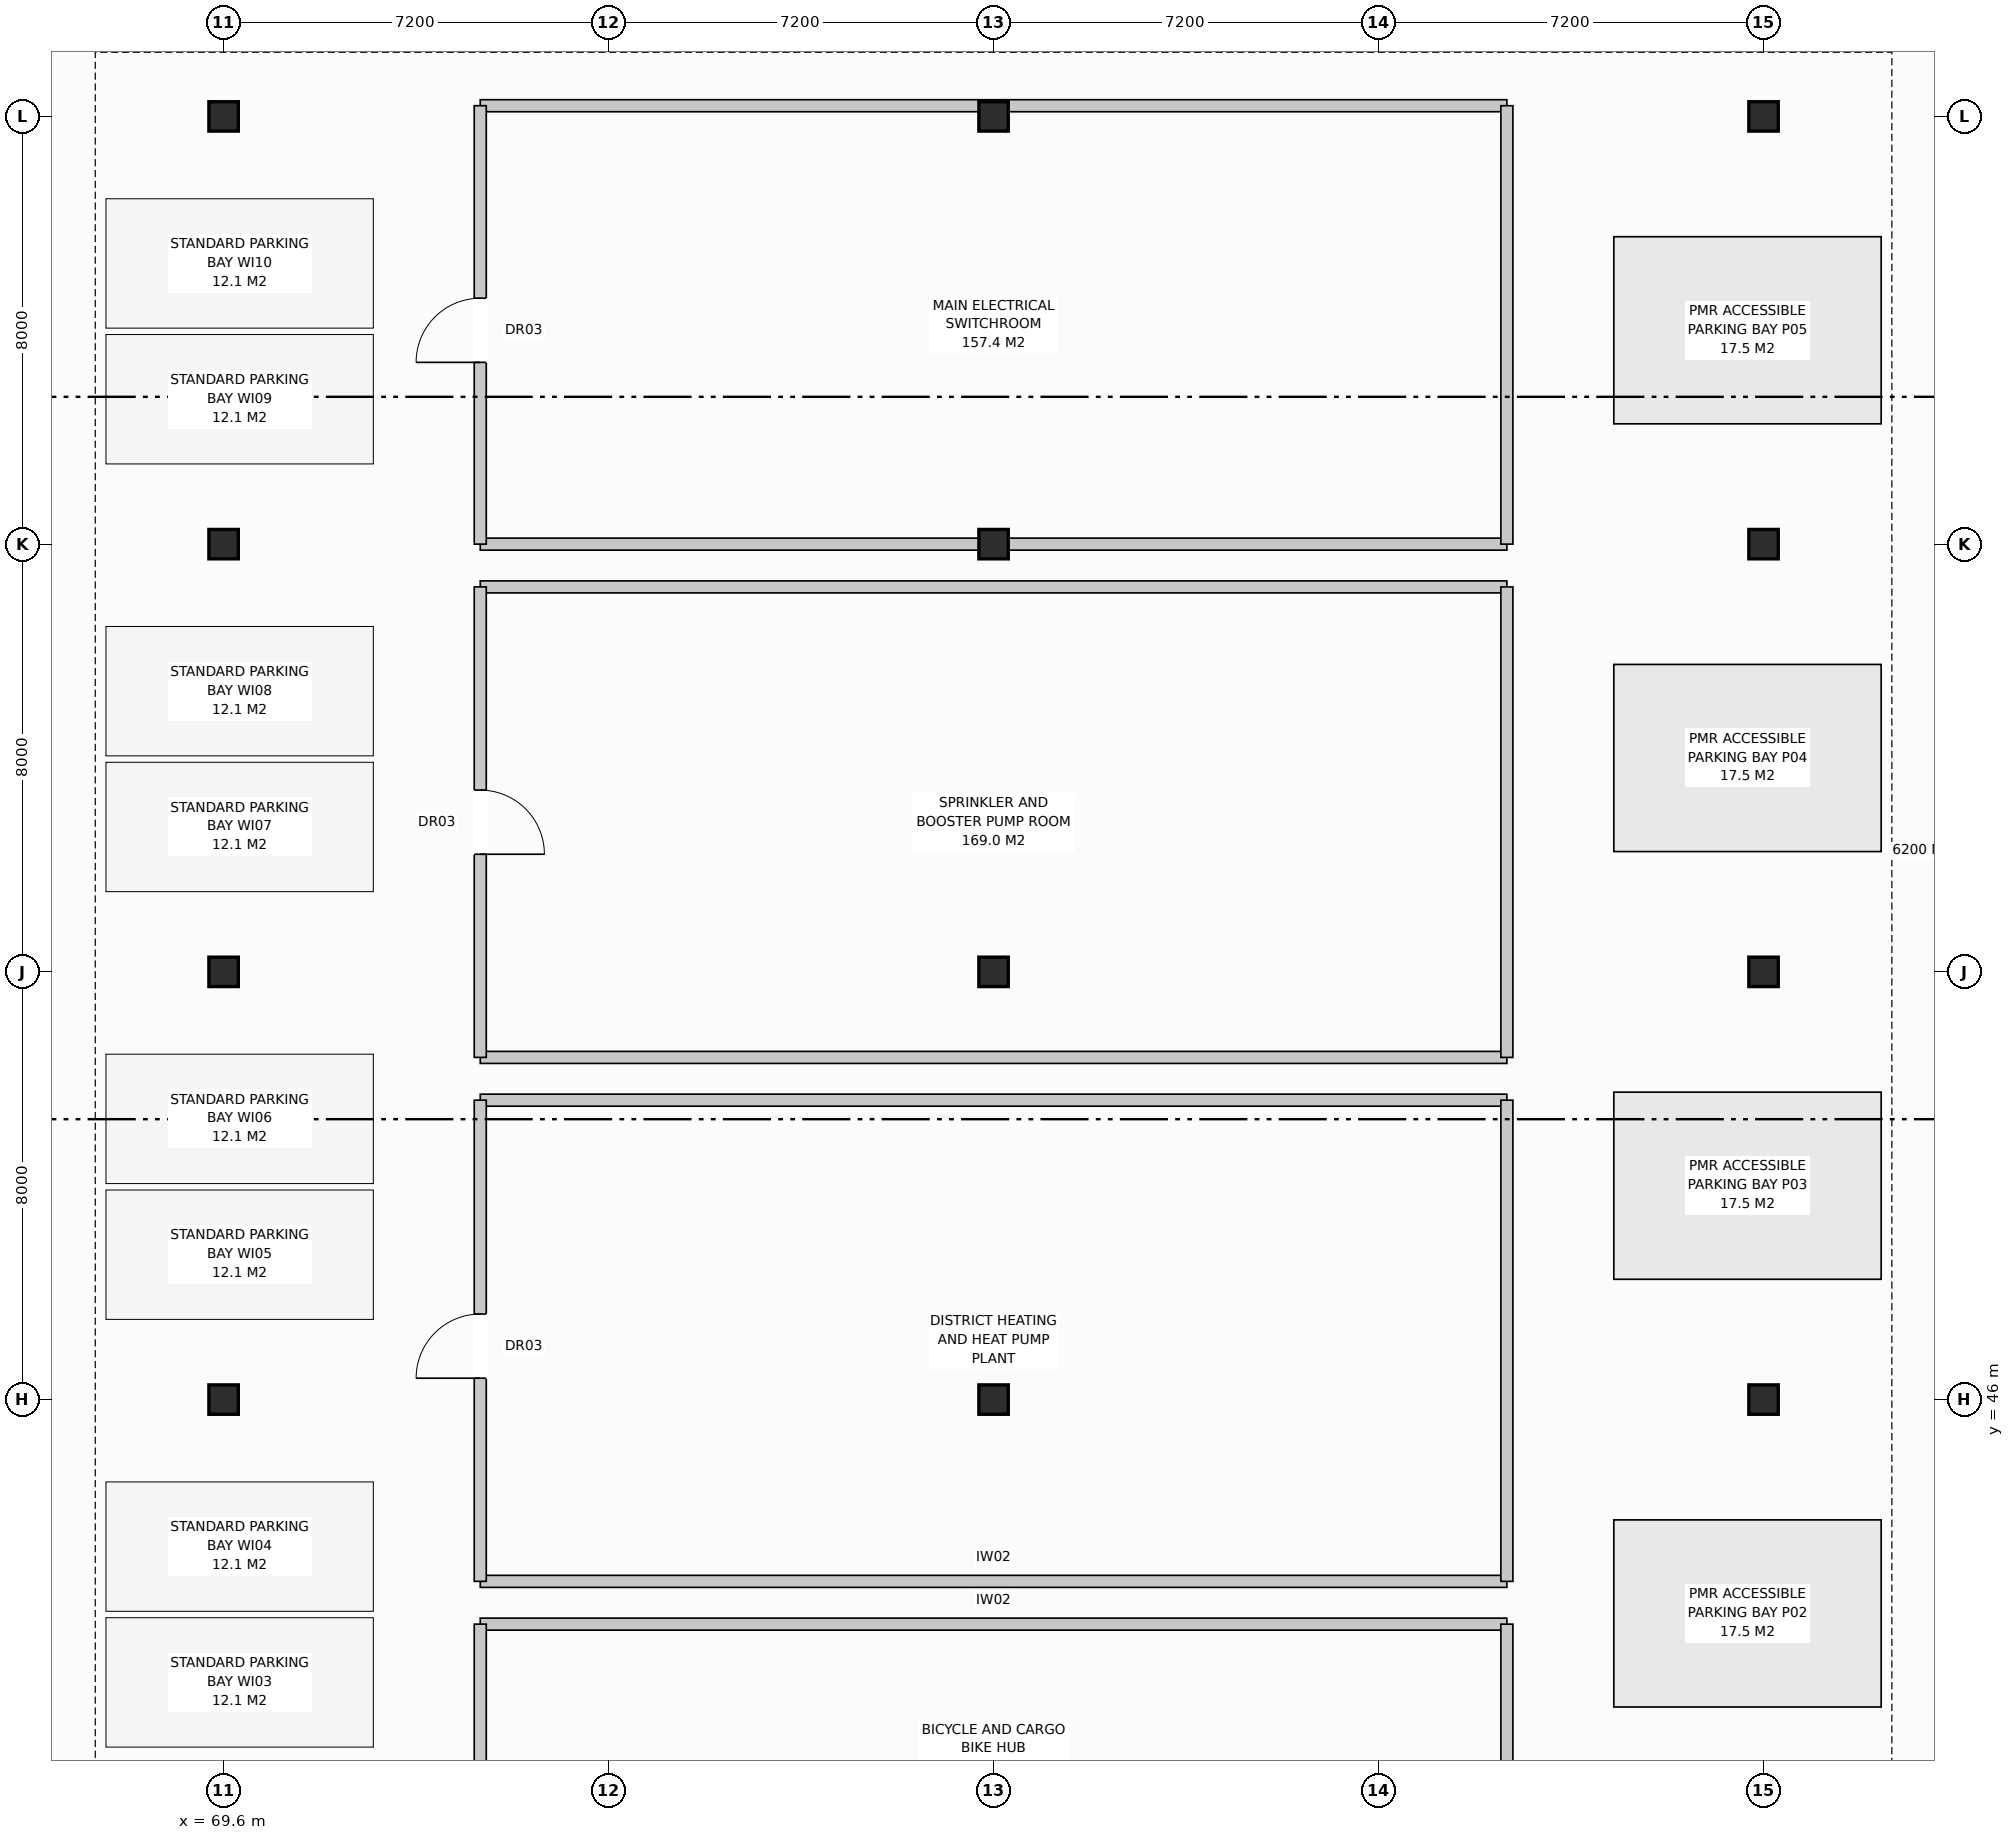
"""IFC4 building model, lengths in metres.
Left out: names, types, materials, properties, quantities, classifications, styles, units other than length and angle.
Written with IfcOpenShell. Run it as: python <this file> out.ifc"""

import sys

from ifc_helpers import new_model, si_unit, direction, frame, frame_2d, origin, origin_with_axes, origin_2d, place, context, subcontext, project, spatial, rectangle, extrude, element, fill, save


model = new_model("IFC4")
c1 = context("Model", 3, precision=1e-05, world=origin(), true_north=direction((0.0, 1.0)))
c2 = subcontext(c1, "Body", "Model", "MODEL_VIEW")
j1 = project(units=[si_unit("LENGTHUNIT", "METRE"), si_unit("PLANEANGLEUNIT", "RADIAN")], contexts=[c1])
p1 = place(None, origin())
s1 = spatial("IfcSite", under=j1, at=p1, CompositionType="ELEMENT")
p2 = place(p1, origin())
s2 = spatial("IfcBuilding", under=s1, at=p2, CompositionType="ELEMENT")
p3 = place(p2, frame((0.0, 0.0, -3.8)))
s3 = spatial("IfcBuildingStorey", under=s2, at=p3, CompositionType="ELEMENT", Elevation=-3.8)
for number, where, z_axis, x_axis in (
    (1, (69.6, 46.0, 0.0), (0.0, 0.0, 1.0), (1.0, 0.0, 0.0)),
    (2, (69.6, 54.0, 0.0), (0.0, 0.0, 1.0), (1.0, 0.0, 0.0)),
    (3, (69.6, 62.0, 0.0), (0.0, 0.0, 1.0), (1.0, 0.0, 0.0)),
    (4, (69.6, 70.0, 0.0), (0.0, 0.0, 1.0), (1.0, 0.0, 0.0)),
    (5, (84.0, 46.0, 0.0), (0.0, 0.0, 1.0), (1.0, 0.0, 0.0)),
    (6, (84.0, 54.0, 0.0), (0.0, 0.0, 1.0), (1.0, 0.0, 0.0)),
    (7, (84.0, 62.0, 0.0), (0.0, 0.0, 1.0), (1.0, 0.0, 0.0)),
    (8, (84.0, 70.0, 0.0), (0.0, 0.0, 1.0), (1.0, 0.0, 0.0)),
    (9, (98.4, 46.0, 0.0), (0.0, 0.0, 1.0), (1.0, 0.0, 0.0)),
    (10, (98.4, 54.0, 0.0), (0.0, 0.0, 1.0), (1.0, 0.0, 0.0)),
    (11, (98.4, 62.0, 0.0), (0.0, 0.0, 1.0), (1.0, 0.0, 0.0)),
    (12, (98.4, 70.0, 0.0), (0.0, 0.0, 1.0), (1.0, 0.0, 0.0)),
):
    element("IfcColumn", number, at=place(p3, frame(where, z_axis=z_axis, x_axis=x_axis)), inside=s3, PredefinedType="COLUMN", context=c2, shape_type="SweptSolid", body=[
        extrude(rectangle(XDim=0.55, YDim=0.55, at=origin_2d()), origin(), (0.0, 0.0, 1.0), 3.8),
    ])
p4 = place(p3, frame((74.4, 41.8, 0.0), z_axis=(0.0, 0.0, 1.0), x_axis=(1.0, 0.0, 0.0)))
e13 = element("IfcWall", 13, at=p4, inside=s3, PredefinedType="PARTITIONING", context=c2, shape_type="SweptSolid", body=[
    extrude(rectangle(XDim=19.2, YDim=0.225, at=frame_2d((9.6, 0.0))), origin(), (0.0, 0.0, 1.0), 3.48),
])
p5 = place(p3, frame((74.4, 32.0, 0.0), z_axis=(0.0, 0.0, 1.0), x_axis=(0.0, 1.0, 0.0)))
e14 = element("IfcWall", 14, at=p5, inside=s3, PredefinedType="PARTITIONING", context=c2, shape_type="SweptSolid", body=[
    extrude(rectangle(XDim=9.8, YDim=0.225, at=frame_2d((4.9, 0.0))), origin(), (0.0, 0.0, 1.0), 3.48),
])
p6 = place(p5, frame((4.2, 0.0, 0.0)))
e15 = element("IfcOpeningElement", 15, at=p6, cuts=e14, PredefinedType="OPENING", context=c2, shape_type="SweptSolid", body=[
    extrude(rectangle(XDim=1.2, YDim=2.15, at=frame_2d((0.6, 1.075))), frame((0.0, 0.125, 0.0), z_axis=(0.0, -1.0, 0.0), x_axis=(1.0, 0.0, 0.0)), (0.0, 0.0, 1.0), 0.249),
])
p7 = place(p3, frame((93.6, 32.0, 0.0), z_axis=(0.0, 0.0, 1.0), x_axis=(0.0, 1.0, 0.0)))
e16 = element("IfcWall", 16, at=p7, inside=s3, PredefinedType="PARTITIONING", context=c2, shape_type="SweptSolid", body=[
    extrude(rectangle(XDim=9.8, YDim=0.225, at=frame_2d((4.9, 0.0))), origin(), (0.0, 0.0, 1.0), 3.48),
])
for number, where, z_axis, x_axis in (
    (17, (74.4, 42.6, 0.0), (0.0, 0.0, 1.0), (1.0, 0.0, 0.0)),
    (18, (74.4, 51.6, 0.0), (0.0, 0.0, 1.0), (1.0, 0.0, 0.0)),
):
    element("IfcWall", number, at=place(p3, frame(where, z_axis=z_axis, x_axis=x_axis)), inside=s3, PredefinedType="PARTITIONING", context=c2, shape_type="SweptSolid", body=[
        extrude(rectangle(XDim=19.2, YDim=0.225, at=frame_2d((9.6, 0.0))), origin(), (0.0, 0.0, 1.0), 3.48),
    ])
p8 = place(p3, frame((74.4, 42.6, 0.0), z_axis=(0.0, 0.0, 1.0), x_axis=(0.0, 1.0, 0.0)))
e19 = element("IfcWall", 19, at=p8, inside=s3, PredefinedType="PARTITIONING", context=c2, shape_type="SweptSolid", body=[
    extrude(rectangle(XDim=9.0, YDim=0.225, at=frame_2d((4.5, 0.0))), origin(), (0.0, 0.0, 1.0), 3.48),
])
p9 = place(p8, frame((3.8, 0.0, 0.0)))
e20 = element("IfcOpeningElement", 20, at=p9, cuts=e19, PredefinedType="OPENING", context=c2, shape_type="SweptSolid", body=[
    extrude(rectangle(XDim=1.2, YDim=2.15, at=frame_2d((0.6, 1.075))), frame((0.0, 0.125, 0.0), z_axis=(0.0, -1.0, 0.0), x_axis=(1.0, 0.0, 0.0)), (0.0, 0.0, 1.0), 0.249),
])
p10 = place(p3, frame((93.6, 42.6, 0.0), z_axis=(0.0, 0.0, 1.0), x_axis=(0.0, 1.0, 0.0)))
e21 = element("IfcWall", 21, at=p10, inside=s3, PredefinedType="PARTITIONING", context=c2, shape_type="SweptSolid", body=[
    extrude(rectangle(XDim=9.0, YDim=0.225, at=frame_2d((4.5, 0.0))), origin(), (0.0, 0.0, 1.0), 3.48),
])
for number, where, z_axis, x_axis in (
    (22, (74.4, 52.4, 0.0), (0.0, 0.0, 1.0), (1.0, 0.0, 0.0)),
    (23, (74.4, 61.2, 0.0), (0.0, 0.0, 1.0), (1.0, 0.0, 0.0)),
):
    element("IfcWall", number, at=place(p3, frame(where, z_axis=z_axis, x_axis=x_axis)), inside=s3, PredefinedType="PARTITIONING", context=c2, shape_type="SweptSolid", body=[
        extrude(rectangle(XDim=19.2, YDim=0.225, at=frame_2d((9.6, 0.0))), origin(), (0.0, 0.0, 1.0), 3.48),
    ])
p11 = place(p3, frame((74.4, 52.4, 0.0), z_axis=(0.0, 0.0, 1.0), x_axis=(0.0, 1.0, 0.0)))
e24 = element("IfcWall", 24, at=p11, inside=s3, PredefinedType="PARTITIONING", context=c2, shape_type="SweptSolid", body=[
    extrude(rectangle(XDim=8.8, YDim=0.225, at=frame_2d((4.4, 0.0))), origin(), (0.0, 0.0, 1.0), 3.48),
])
p12 = place(p11, frame((3.8, 0.0, 0.0)))
e25 = element("IfcOpeningElement", 25, at=p12, cuts=e24, PredefinedType="OPENING", context=c2, shape_type="SweptSolid", body=[
    extrude(rectangle(XDim=1.2, YDim=2.15, at=frame_2d((0.6, 1.075))), frame((0.0, 0.125, 0.0), z_axis=(0.0, -1.0, 0.0), x_axis=(1.0, 0.0, 0.0)), (0.0, 0.0, 1.0), 0.249),
])
p13 = place(p3, frame((93.6, 52.4, 0.0), z_axis=(0.0, 0.0, 1.0), x_axis=(0.0, 1.0, 0.0)))
e26 = element("IfcWall", 26, at=p13, inside=s3, PredefinedType="PARTITIONING", context=c2, shape_type="SweptSolid", body=[
    extrude(rectangle(XDim=8.8, YDim=0.225, at=frame_2d((4.4, 0.0))), origin(), (0.0, 0.0, 1.0), 3.48),
])
for number, where, z_axis, x_axis in (
    (27, (74.4, 62.0, 0.0), (0.0, 0.0, 1.0), (1.0, 0.0, 0.0)),
    (28, (74.4, 70.2, 0.0), (0.0, 0.0, 1.0), (1.0, 0.0, 0.0)),
):
    element("IfcWall", number, at=place(p3, frame(where, z_axis=z_axis, x_axis=x_axis)), inside=s3, PredefinedType="PARTITIONING", context=c2, shape_type="SweptSolid", body=[
        extrude(rectangle(XDim=19.2, YDim=0.225, at=frame_2d((9.6, 0.0))), origin(), (0.0, 0.0, 1.0), 2.57),
    ])
p14 = place(p3, frame((74.4, 62.0, 0.0), z_axis=(0.0, 0.0, 1.0), x_axis=(0.0, 1.0, 0.0)))
e29 = element("IfcWall", 29, at=p14, inside=s3, PredefinedType="PARTITIONING", context=c2, shape_type="SweptSolid", body=[
    extrude(rectangle(XDim=8.2, YDim=0.225, at=frame_2d((4.1, 0.0))), origin(), (0.0, 0.0, 1.0), 3.48),
])
p15 = place(p14, frame((3.4, 0.0, 0.0)))
e30 = element("IfcOpeningElement", 30, at=p15, cuts=e29, PredefinedType="OPENING", context=c2, shape_type="SweptSolid", body=[
    extrude(rectangle(XDim=1.2, YDim=2.15, at=frame_2d((0.6, 1.075))), frame((0.0, 0.125, 0.0), z_axis=(0.0, -1.0, 0.0), x_axis=(1.0, 0.0, 0.0)), (0.0, 0.0, 1.0), 0.249),
])
p16 = place(p3, frame((93.6, 62.0, 0.0), z_axis=(0.0, 0.0, 1.0), x_axis=(0.0, 1.0, 0.0)))
e31 = element("IfcWall", 31, at=p16, inside=s3, PredefinedType="PARTITIONING", context=c2, shape_type="SweptSolid", body=[
    extrude(rectangle(XDim=8.2, YDim=0.225, at=frame_2d((4.1, 0.0))), origin(), (0.0, 0.0, 1.0), 3.48),
])
p17 = place(p9, origin_with_axes())
e32 = element("IfcDoor", 32, at=p17, inside=s3, OperationType="SINGLE_SWING_LEFT", PredefinedType="DOOR", context=c2, shape_type="SweptSolid", body=[
    extrude(rectangle(XDim=1.2, YDim=2.15, at=frame_2d((0.6, 1.075))), frame((0.0, 0.025, 0.0), z_axis=(0.0, -1.0, 0.0), x_axis=(1.0, 0.0, 0.0)), (0.0, 0.0, 1.0), 0.05),
])
fill(e20, e32)
p18 = place(p12, frame((1.2, 0.0, 0.0), z_axis=(0.0, 0.0, 1.0), x_axis=(-1.0, 0.0, 0.0)))
e33 = element("IfcDoor", 33, at=p18, inside=s3, OperationType="SINGLE_SWING_LEFT", PredefinedType="DOOR", context=c2, shape_type="SweptSolid", body=[
    extrude(rectangle(XDim=1.2, YDim=2.15, at=frame_2d((0.6, 1.075))), frame((0.0, 0.025, 0.0), z_axis=(0.0, -1.0, 0.0), x_axis=(1.0, 0.0, 0.0)), (0.0, 0.0, 1.0), 0.05),
])
fill(e25, e33)
p19 = place(p15, origin_with_axes())
e34 = element("IfcDoor", 34, at=p19, inside=s3, OperationType="SINGLE_SWING_LEFT", PredefinedType="DOOR", context=c2, shape_type="SweptSolid", body=[
    extrude(rectangle(XDim=1.2, YDim=2.15, at=frame_2d((0.6, 1.075))), frame((0.0, 0.025, 0.0), z_axis=(0.0, -1.0, 0.0), x_axis=(1.0, 0.0, 0.0)), (0.0, 0.0, 1.0), 0.05),
])
fill(e30, e34)
save(model, sys.argv[1])
